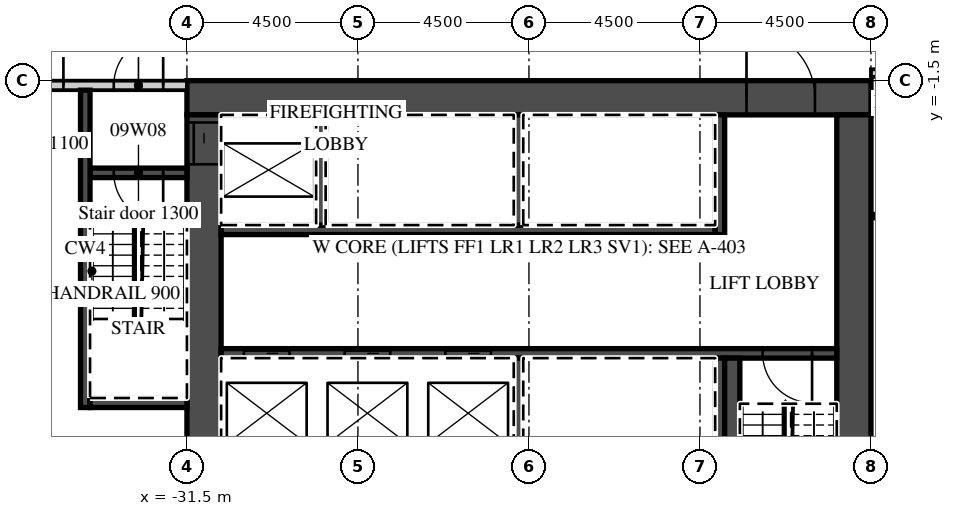
"""IFC4 building model, lengths in metres.
Left out: names, types, materials, properties, quantities, classifications, styles, units other than length and angle.
Written with IfcOpenShell. Run it as: python <this file> out.ifc"""

import sys

from ifc_helpers import new_model, si_unit, direction, frame, frame_2d, origin, place, context, subcontext, project, spatial, rectangle, extrude, element, fill, save


model = new_model("IFC4")
c1 = context("Model", 3, precision=1e-05, world=origin(), true_north=direction((0.0, 1.0)))
c2 = subcontext(c1, "Body", "Model", "MODEL_VIEW")
j1 = project(units=[si_unit("LENGTHUNIT", "METRE"), si_unit("PLANEANGLEUNIT", "RADIAN")], contexts=[c1])
p1 = place(None, origin())
s1 = spatial("IfcSite", under=j1, at=p1, CompositionType="ELEMENT")
p2 = place(p1, origin())
s2 = spatial("IfcBuilding", under=s1, at=p2, CompositionType="ELEMENT")
p3 = place(p2, frame((0.0, 0.0, 60.0)))
s3 = spatial("IfcBuildingStorey", under=s2, at=p3, CompositionType="ELEMENT", Elevation=60.0)
p4 = place(p3, frame((-13.5, -1.3, 0.0), z_axis=(0.0, 0.0, 1.0), x_axis=(1.0, 0.0, 0.0)))
e1 = element("IfcWall", 1, at=p4, inside=s3, PredefinedType="PARTITIONING", context=c2, shape_type="SweptSolid", body=[
    extrude(rectangle(XDim=58.05, YDim=0.2, at=frame_2d((29.025, 0.0))), origin(), (0.0, 0.0, 1.0), 3.02),
])
p5 = place(p4, frame((2.925, 0.0, 0.0)))
e2 = element("IfcOpeningElement", 2, at=p5, cuts=e1, PredefinedType="OPENING", context=c2, shape_type="SweptSolid", body=[
    extrude(rectangle(XDim=1.0, YDim=2.1, at=frame_2d((0.5, 1.05))), frame((0.0, 0.11, 0.0), z_axis=(0.0, -1.0, 0.0), x_axis=(1.0, 0.0, 0.0)), (0.0, 0.0, 1.0), 0.22),
])
p6 = place(p4, frame((9.863, 0.0, 0.0)))
e3 = element("IfcOpeningElement", 3, at=p6, cuts=e1, PredefinedType="OPENING", context=c2, shape_type="SweptSolid", body=[
    extrude(rectangle(XDim=1.2, YDim=2.1, at=frame_2d((0.6, 1.05))), frame((0.0, 0.11, 0.0), z_axis=(0.0, -1.0, 0.0), x_axis=(1.0, 0.0, 0.0)), (0.0, 0.0, 1.0), 0.22),
])
p7 = place(p4, frame((16.45, 0.0, 0.0)))
e4 = element("IfcOpeningElement", 4, at=p7, cuts=e1, PredefinedType="OPENING", context=c2, shape_type="SweptSolid", body=[
    extrude(rectangle(XDim=1.0, YDim=2.1, at=frame_2d((0.5, 1.05))), frame((0.0, 0.11, 0.0), z_axis=(0.0, -1.0, 0.0), x_axis=(1.0, 0.0, 0.0)), (0.0, 0.0, 1.0), 0.22),
])
p8 = place(p4, frame((18.55, 0.0, 0.0)))
e5 = element("IfcOpeningElement", 5, at=p8, cuts=e1, PredefinedType="OPENING", context=c2, shape_type="SweptSolid", body=[
    extrude(rectangle(XDim=1.0, YDim=2.1, at=frame_2d((0.5, 1.05))), frame((0.0, 0.11, 0.0), z_axis=(0.0, -1.0, 0.0), x_axis=(1.0, 0.0, 0.0)), (0.0, 0.0, 1.0), 0.22),
])
p9 = place(p4, frame((24.938, 0.0, 0.0)))
e6 = element("IfcOpeningElement", 6, at=p9, cuts=e1, PredefinedType="OPENING", context=c2, shape_type="SweptSolid", body=[
    extrude(rectangle(XDim=1.2, YDim=2.1, at=frame_2d((0.6, 1.05))), frame((0.0, 0.11, 0.0), z_axis=(0.0, -1.0, 0.0), x_axis=(1.0, 0.0, 0.0)), (0.0, 0.0, 1.0), 0.22),
])
p10 = place(p4, frame((33.938, 0.0, 0.0)))
e7 = element("IfcOpeningElement", 7, at=p10, cuts=e1, PredefinedType="OPENING", context=c2, shape_type="SweptSolid", body=[
    extrude(rectangle(XDim=1.2, YDim=2.1, at=frame_2d((0.6, 1.05))), frame((0.0, 0.11, 0.0), z_axis=(0.0, -1.0, 0.0), x_axis=(1.0, 0.0, 0.0)), (0.0, 0.0, 1.0), 0.22),
])
p11 = place(p4, frame((42.938, 0.0, 0.0)))
e8 = element("IfcOpeningElement", 8, at=p11, cuts=e1, PredefinedType="OPENING", context=c2, shape_type="SweptSolid", body=[
    extrude(rectangle(XDim=1.2, YDim=2.1, at=frame_2d((0.6, 1.05))), frame((0.0, 0.11, 0.0), z_axis=(0.0, -1.0, 0.0), x_axis=(1.0, 0.0, 0.0)), (0.0, 0.0, 1.0), 0.22),
])
p12 = place(p4, frame((52.425, 0.0, 0.0)))
e9 = element("IfcOpeningElement", 9, at=p12, cuts=e1, PredefinedType="OPENING", context=c2, shape_type="SweptSolid", body=[
    extrude(rectangle(XDim=1.0, YDim=2.1, at=frame_2d((0.5, 1.05))), frame((0.0, 0.11, 0.0), z_axis=(0.0, -1.0, 0.0), x_axis=(1.0, 0.0, 0.0)), (0.0, 0.0, 1.0), 0.22),
])
p13 = place(p4, frame((56.525, 0.0, 0.0)))
e10 = element("IfcOpeningElement", 10, at=p13, cuts=e1, PredefinedType="OPENING", context=c2, shape_type="SweptSolid", body=[
    extrude(rectangle(XDim=1.0, YDim=2.1, at=frame_2d((0.5, 1.05))), frame((0.0, 0.11, 0.0), z_axis=(0.0, -1.0, 0.0), x_axis=(1.0, 0.0, 0.0)), (0.0, 0.0, 1.0), 0.22),
])
p14 = place(p3, frame((-31.5, -1.95, 0.0), z_axis=(0.0, 0.0, 1.0), x_axis=(1.0, 0.0, 0.0)))
e11 = element("IfcWall", 11, at=p14, inside=s3, PredefinedType="SHEAR", context=c2, shape_type="SweptSolid", body=[
    extrude(rectangle(XDim=18.0, YDim=0.9, at=frame_2d((9.0, 0.0))), origin(), (0.0, 0.0, 1.0), 3.02),
])
p15 = place(p14, frame((14.725, 0.0, 0.0)))
e12 = element("IfcOpeningElement", 12, at=p15, cuts=e11, PredefinedType="OPENING", context=c2, shape_type="SweptSolid", body=[
    extrude(rectangle(XDim=1.8, YDim=2.1, at=frame_2d((0.9, 1.05))), frame((0.0, 0.46, 0.0), z_axis=(0.0, -1.0, 0.0), x_axis=(1.0, 0.0, 0.0)), (0.0, 0.0, 1.0), 0.92),
])
p16 = place(p3, frame((-31.05, -15.2, 0.0), z_axis=(0.0, 0.0, 1.0), x_axis=(0.0, 1.0, 0.0)))
e13 = element("IfcWall", 13, at=p16, inside=s3, PredefinedType="SHEAR", context=c2, shape_type="SweptSolid", body=[
    extrude(rectangle(XDim=12.8, YDim=0.9, at=frame_2d((6.4, 0.0))), origin(), (0.0, 0.0, 1.0), 3.02),
])
p17 = place(p16, frame((11.5, 0.0, 0.0)))
e14 = element("IfcOpeningElement", 14, at=p17, cuts=e13, PredefinedType="OPENING", context=c2, shape_type="SweptSolid", body=[
    extrude(rectangle(XDim=1.1, YDim=2.1, at=frame_2d((0.55, 1.05))), frame((0.0, 0.46, 0.0), z_axis=(0.0, -1.0, 0.0), x_axis=(1.0, 0.0, 0.0)), (0.0, 0.0, 1.0), 0.92),
])
p18 = place(p3, frame((-13.95, -14.6, 0.0), z_axis=(0.0, 0.0, 1.0), x_axis=(0.0, 1.0, 0.0)))
e15 = element("IfcWall", 15, at=p18, inside=s3, PredefinedType="SHEAR", context=c2, shape_type="SweptSolid", body=[
    extrude(rectangle(XDim=12.2, YDim=0.9, at=frame_2d((6.1, 0.0))), origin(), (0.0, 0.0, 1.0), 3.02),
])
p19 = place(p3, frame((-30.6, -5.425, 0.0), z_axis=(0.0, 0.0, 1.0), x_axis=(1.0, 0.0, 0.0)))
e16 = element("IfcWall", 16, at=p19, inside=s3, PredefinedType="SHEAR", context=c2, shape_type="SweptSolid", body=[
    extrude(rectangle(XDim=13.0, YDim=0.25, at=frame_2d((6.5, 0.0))), origin(), (0.0, 0.0, 1.0), 3.02),
])
p20 = place(p3, frame((-17.475, -5.55, 0.0), z_axis=(0.0, 0.0, 1.0), x_axis=(0.0, 1.0, 0.0)))
e17 = element("IfcWall", 17, at=p20, inside=s3, PredefinedType="SHEAR", context=c2, shape_type="SweptSolid", body=[
    extrude(rectangle(XDim=3.15, YDim=0.25, at=frame_2d((1.575, 0.0))), origin(), (0.0, 0.0, 1.0), 3.02),
])
for number, where, z_axis, x_axis in (
    (18, (-27.975, -5.3, 0.0), (0.0, 0.0, 1.0), (0.0, 1.0, 0.0)),
    (19, (-22.775, -5.3, 0.0), (0.0, 0.0, 1.0), (0.0, 1.0, 0.0)),
):
    element("IfcWall", number, at=place(p3, frame(where, z_axis=z_axis, x_axis=x_axis)), inside=s3, PredefinedType="SHEAR", context=c2, shape_type="SweptSolid", body=[
        extrude(rectangle(XDim=2.9, YDim=0.25, at=frame_2d((1.45, 0.0))), origin(), (0.0, 0.0, 1.0), 3.02),
    ])
p21 = place(p3, frame((-30.6, -8.675, 0.0), z_axis=(0.0, 0.0, 1.0), x_axis=(1.0, 0.0, 0.0)))
e20 = element("IfcWall", 20, at=p21, inside=s3, PredefinedType="SHEAR", context=c2, shape_type="SweptSolid", body=[
    extrude(rectangle(XDim=16.2, YDim=0.25, at=frame_2d((8.1, 0.0))), origin(), (0.0, 0.0, 1.0), 3.02),
])
p22 = place(p21, frame((0.6, 0.0, 0.0)))
e21 = element("IfcOpeningElement", 21, at=p22, cuts=e20, PredefinedType="OPENING", context=c2, shape_type="SweptSolid", body=[
    extrude(rectangle(XDim=1.2, YDim=2.1, at=frame_2d((0.6, 1.05))), frame((0.0, 0.135, 0.0), z_axis=(0.0, -1.0, 0.0), x_axis=(1.0, 0.0, 0.0)), (0.0, 0.0, 1.0), 0.27),
])
p23 = place(p21, frame((3.25, 0.0, 0.0)))
e22 = element("IfcOpeningElement", 22, at=p23, cuts=e20, PredefinedType="OPENING", context=c2, shape_type="SweptSolid", body=[
    extrude(rectangle(XDim=1.2, YDim=2.1, at=frame_2d((0.6, 1.05))), frame((0.0, 0.135, 0.0), z_axis=(0.0, -1.0, 0.0), x_axis=(1.0, 0.0, 0.0)), (0.0, 0.0, 1.0), 0.27),
])
p24 = place(p21, frame((5.9, 0.0, 0.0)))
e23 = element("IfcOpeningElement", 23, at=p24, cuts=e20, PredefinedType="OPENING", context=c2, shape_type="SweptSolid", body=[
    extrude(rectangle(XDim=1.2, YDim=2.1, at=frame_2d((0.6, 1.05))), frame((0.0, 0.135, 0.0), z_axis=(0.0, -1.0, 0.0), x_axis=(1.0, 0.0, 0.0)), (0.0, 0.0, 1.0), 0.27),
])
p25 = place(p21, frame((14.25, 0.0, 0.0)))
e24 = element("IfcOpeningElement", 24, at=p25, cuts=e20, PredefinedType="OPENING", context=c2, shape_type="SweptSolid", body=[
    extrude(rectangle(XDim=1.3, YDim=2.1, at=frame_2d((0.65, 1.05))), frame((0.0, 0.135, 0.0), z_axis=(0.0, -1.0, 0.0), x_axis=(1.0, 0.0, 0.0)), (0.0, 0.0, 1.0), 0.27),
])
for number, where, z_axis, x_axis in (
    (25, (-17.475, -11.7, 0.0), (0.0, 0.0, 1.0), (0.0, 1.0, 0.0)),
    (26, (-22.775, -11.7, 0.0), (0.0, 0.0, 1.0), (0.0, 1.0, 0.0)),
):
    element("IfcWall", number, at=place(p3, frame(where, z_axis=z_axis, x_axis=x_axis)), inside=s3, PredefinedType="SHEAR", context=c2, shape_type="SweptSolid", body=[
        extrude(rectangle(XDim=2.9, YDim=0.25, at=frame_2d((1.45, 0.0))), origin(), (0.0, 0.0, 1.0), 3.02),
    ])
p26 = place(p3, frame((-17.15, -14.6, 0.0), z_axis=(0.0, 0.0, 1.0), x_axis=(0.0, 1.0, 0.0)))
e27 = element("IfcWall", 27, at=p26, inside=s3, PredefinedType="SHEAR", context=c2, shape_type="SweptSolid", body=[
    extrude(rectangle(XDim=5.8, YDim=0.4, at=frame_2d((2.9, 0.0))), origin(), (0.0, 0.0, 1.0), 3.02),
])
p27 = place(p3, frame((-44.55, -1.625, 0.0), z_axis=(0.0, 0.0, 1.0), x_axis=(1.0, 0.0, 0.0)))
e28 = element("IfcWall", 28, at=p27, inside=s3, PredefinedType="PARTITIONING", context=c2, shape_type="SweptSolid", body=[
    extrude(rectangle(XDim=13.05, YDim=0.25, at=frame_2d((6.525, 0.0))), origin(), (0.0, 0.0, 1.0), 3.02),
])
p28 = place(p27, frame((11.125, 0.0, 0.0)))
e29 = element("IfcOpeningElement", 29, at=p28, cuts=e28, PredefinedType="OPENING", context=c2, shape_type="SweptSolid", body=[
    extrude(rectangle(XDim=1.3, YDim=2.1, at=frame_2d((0.65, 1.05))), frame((0.0, 0.135, 0.0), z_axis=(0.0, -1.0, 0.0), x_axis=(1.0, 0.0, 0.0)), (0.0, 0.0, 1.0), 0.27),
])
p29 = place(p27, frame((8.7, 0.0, 0.0)))
e30 = element("IfcOpeningElement", 30, at=p29, cuts=e28, PredefinedType="OPENING", context=c2, shape_type="SweptSolid", body=[
    extrude(rectangle(XDim=1.1, YDim=2.1, at=frame_2d((0.55, 1.05))), frame((0.0, 0.135, 0.0), z_axis=(0.0, -1.0, 0.0), x_axis=(1.0, 0.0, 0.0)), (0.0, 0.0, 1.0), 0.27),
])
p30 = place(p3, frame((-34.05, -3.925, 0.0), z_axis=(0.0, 0.0, 1.0), x_axis=(1.0, 0.0, 0.0)))
e31 = element("IfcWall", 31, at=p30, inside=s3, PredefinedType="SHEAR", context=c2, shape_type="SweptSolid", body=[
    extrude(rectangle(XDim=2.55, YDim=0.25, at=frame_2d((1.275, 0.0))), origin(), (0.0, 0.0, 1.0), 3.02),
])
p31 = place(p30, frame((0.625, 0.0, 0.0)))
e32 = element("IfcOpeningElement", 32, at=p31, cuts=e31, PredefinedType="OPENING", context=c2, shape_type="SweptSolid", body=[
    extrude(rectangle(XDim=1.3, YDim=2.1, at=frame_2d((0.65, 1.05))), frame((0.0, 0.135, 0.0), z_axis=(0.0, -1.0, 0.0), x_axis=(1.0, 0.0, 0.0)), (0.0, 0.0, 1.0), 0.27),
])
p32 = place(p3, frame((-34.175, -10.1, 0.0), z_axis=(0.0, 0.0, 1.0), x_axis=(0.0, 1.0, 0.0)))
e33 = element("IfcWall", 33, at=p32, inside=s3, PredefinedType="SHEAR", context=c2, shape_type="SweptSolid", body=[
    extrude(rectangle(XDim=8.35, YDim=0.25, at=frame_2d((4.175, 0.0))), origin(), (0.0, 0.0, 1.0), 3.02),
])
p33 = place(p3, frame((-34.05, -9.975, 0.0), z_axis=(0.0, 0.0, 1.0), x_axis=(1.0, 0.0, 0.0)))
e34 = element("IfcWall", 34, at=p33, inside=s3, PredefinedType="SHEAR", context=c2, shape_type="SweptSolid", body=[
    extrude(rectangle(XDim=2.55, YDim=0.25, at=frame_2d((1.275, 0.0))), origin(), (0.0, 0.0, 1.0), 3.02),
])
p34 = place(p22, origin())
e35 = element("IfcDoor", 35, at=p34, inside=s3, OperationType="SLIDING_TO_LEFT", PredefinedType="DOOR", context=c2, shape_type="SweptSolid", body=[
    extrude(rectangle(XDim=1.2, YDim=2.1, at=frame_2d((0.6, 1.05))), frame((0.0, 0.025, 0.0), z_axis=(0.0, -1.0, 0.0), x_axis=(1.0, 0.0, 0.0)), (0.0, 0.0, 1.0), 0.05),
])
fill(e21, e35)
p35 = place(p23, origin())
e36 = element("IfcDoor", 36, at=p35, inside=s3, OperationType="SLIDING_TO_RIGHT", PredefinedType="DOOR", context=c2, shape_type="SweptSolid", body=[
    extrude(rectangle(XDim=1.2, YDim=2.1, at=frame_2d((0.6, 1.05))), frame((0.0, 0.025, 0.0), z_axis=(0.0, -1.0, 0.0), x_axis=(1.0, 0.0, 0.0)), (0.0, 0.0, 1.0), 0.05),
])
fill(e22, e36)
p36 = place(p24, origin())
e37 = element("IfcDoor", 37, at=p36, inside=s3, OperationType="SLIDING_TO_RIGHT", PredefinedType="DOOR", context=c2, shape_type="SweptSolid", body=[
    extrude(rectangle(XDim=1.2, YDim=2.1, at=frame_2d((0.6, 1.05))), frame((0.0, 0.025, 0.0), z_axis=(0.0, -1.0, 0.0), x_axis=(1.0, 0.0, 0.0)), (0.0, 0.0, 1.0), 0.05),
])
fill(e23, e37)
p37 = place(p17, origin())
e38 = element("IfcDoor", 38, at=p37, inside=s3, OperationType="SLIDING_TO_RIGHT", PredefinedType="DOOR", context=c2, shape_type="SweptSolid", body=[
    extrude(rectangle(XDim=1.1, YDim=2.1, at=frame_2d((0.55, 1.05))), frame((0.0, 0.025, 0.0), z_axis=(0.0, -1.0, 0.0), x_axis=(1.0, 0.0, 0.0)), (0.0, 0.0, 1.0), 0.05),
])
fill(e14, e38)
p38 = place(p15, origin())
e39 = element("IfcDoor", 39, at=p38, inside=s3, OperationType="DOUBLE_DOOR_DOUBLE_SWING", PredefinedType="DOOR", context=c2, shape_type="SweptSolid", body=[
    extrude(rectangle(XDim=1.8, YDim=2.1, at=frame_2d((0.9, 1.05))), frame((0.0, 0.025, 0.0), z_axis=(0.0, -1.0, 0.0), x_axis=(1.0, 0.0, 0.0)), (0.0, 0.0, 1.0), 0.05),
])
fill(e12, e39)
p39 = place(p28, origin())
e40 = element("IfcDoor", 40, at=p39, inside=s3, OperationType="SINGLE_SWING_RIGHT", PredefinedType="DOOR", context=c2, shape_type="SweptSolid", body=[
    extrude(rectangle(XDim=1.3, YDim=2.1, at=frame_2d((0.65, 1.05))), frame((0.0, 0.025, 0.0), z_axis=(0.0, -1.0, 0.0), x_axis=(1.0, 0.0, 0.0)), (0.0, 0.0, 1.0), 0.05),
])
fill(e29, e40)
p40 = place(p31, origin())
e41 = element("IfcDoor", 41, at=p40, inside=s3, OperationType="SINGLE_SWING_RIGHT", PredefinedType="DOOR", context=c2, shape_type="SweptSolid", body=[
    extrude(rectangle(XDim=1.3, YDim=2.1, at=frame_2d((0.65, 1.05))), frame((0.0, 0.025, 0.0), z_axis=(0.0, -1.0, 0.0), x_axis=(1.0, 0.0, 0.0)), (0.0, 0.0, 1.0), 0.05),
])
fill(e32, e41)
p41 = place(p29, origin())
e42 = element("IfcDoor", 42, at=p41, inside=s3, OperationType="SINGLE_SWING_RIGHT", PredefinedType="DOOR", context=c2, shape_type="SweptSolid", body=[
    extrude(rectangle(XDim=1.1, YDim=2.1, at=frame_2d((0.55, 1.05))), frame((0.0, 0.025, 0.0), z_axis=(0.0, -1.0, 0.0), x_axis=(1.0, 0.0, 0.0)), (0.0, 0.0, 1.0), 0.05),
])
fill(e30, e42)
p42 = place(p25, origin())
e43 = element("IfcDoor", 43, at=p42, inside=s3, OperationType="SINGLE_SWING_RIGHT", PredefinedType="DOOR", context=c2, shape_type="SweptSolid", body=[
    extrude(rectangle(XDim=1.3, YDim=2.1, at=frame_2d((0.65, 1.05))), frame((0.0, 0.025, 0.0), z_axis=(0.0, -1.0, 0.0), x_axis=(1.0, 0.0, 0.0)), (0.0, 0.0, 1.0), 0.05),
])
fill(e24, e43)
save(model, sys.argv[1])
